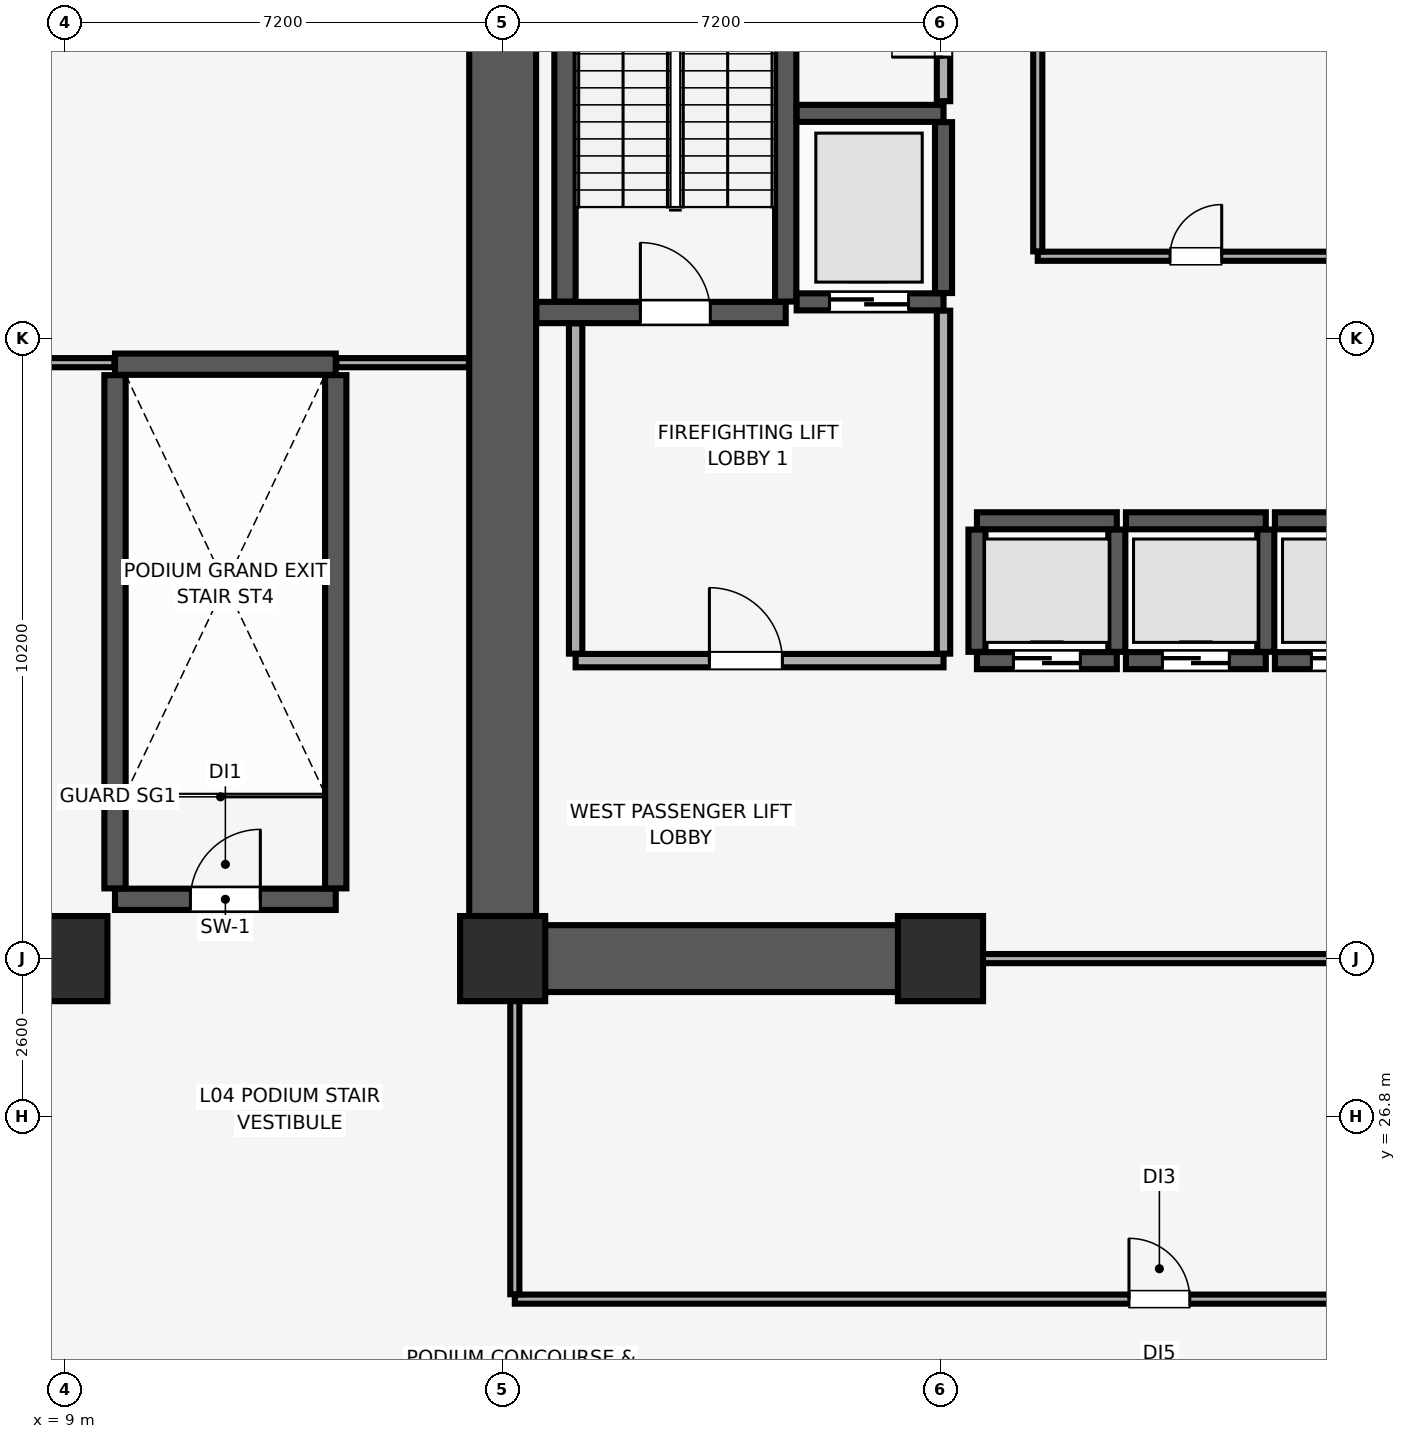
"""IFC4 building model, lengths in metres.
Left out: names, types, materials, properties, quantities, classifications, styles, units other than length and angle.
Written with IfcOpenShell. Run it as: python <this file> out.ifc"""

import sys

from ifc_helpers import new_model, si_unit, direction, frame, frame_2d, origin, origin_2d, place, context, subcontext, project, spatial, rectangle, extrude, element, fill, save


model = new_model("IFC4")
c1 = context("Model", 3, precision=1e-05, world=origin(), true_north=direction((0.0, 1.0)))
c2 = subcontext(c1, "Body", "Model", "MODEL_VIEW")
j1 = project(units=[si_unit("LENGTHUNIT", "METRE"), si_unit("PLANEANGLEUNIT", "RADIAN")], contexts=[c1])
p1 = place(None, origin())
s1 = spatial("IfcSite", under=j1, at=p1, CompositionType="ELEMENT")
p2 = place(p1, origin())
s2 = spatial("IfcBuilding", under=s1, at=p2, CompositionType="ELEMENT")
p3 = place(p2, frame((0.0, 0.0, 26.0)))
s3 = spatial("IfcBuildingStorey", under=s2, at=p3, CompositionType="ELEMENT", Elevation=26.0)
for number, where, z_axis, x_axis in (
    (1, (9.0, 29.4, 0.0), (0.0, 0.0, 1.0), (1.0, 0.0, 0.0)),
    (2, (16.2, 29.4, 0.0), (0.0, 0.0, 1.0), (1.0, 0.0, 0.0)),
    (3, (23.4, 29.4, 0.0), (0.0, 0.0, 1.0), (1.0, 0.0, 0.0)),
):
    element("IfcColumn", number, at=place(p3, frame(where, z_axis=z_axis, x_axis=x_axis)), inside=s3, PredefinedType="COLUMN", context=c2, shape_type="SweptSolid", body=[
        extrude(rectangle(XDim=1.4, YDim=1.4, at=origin_2d()), origin(), (0.0, 0.0, 1.0), 5.16),
    ])
p4 = place(p3, frame((16.2, 29.4, 0.0), z_axis=(0.0, 0.0, 1.0), x_axis=(0.0, 1.0, 0.0)))
e4 = element("IfcWall", 4, at=p4, inside=s3, PredefinedType="SHEAR", context=c2, shape_type="SweptSolid", body=[
    extrude(rectangle(XDim=19.2, YDim=1.1, at=frame_2d((9.6, 0.0))), origin(), (0.0, 0.0, 1.0), 5.12),
])
p5 = place(p3, frame((16.755, 29.4, 0.0), z_axis=(0.0, 0.0, 1.0), x_axis=(1.0, 0.0, 0.0)))
e5 = element("IfcWall", 5, at=p5, inside=s3, PredefinedType="SHEAR", context=c2, shape_type="SweptSolid", body=[
    extrude(rectangle(XDim=6.845, YDim=1.1, at=frame_2d((3.423, 0.0))), origin(), (0.0, 0.0, 1.0), 5.12),
])
p6 = place(p3, frame((16.755, 40.025, 0.0), z_axis=(0.0, 0.0, 1.0), x_axis=(1.0, 0.0, 0.0)))
e6 = element("IfcWall", 6, at=p6, inside=s3, PredefinedType="SHEAR", context=c2, shape_type="SweptSolid", body=[
    extrude(rectangle(XDim=4.1, YDim=0.35, at=frame_2d((2.05, 0.0))), origin(), (0.0, 0.0, 1.0), 5.12),
])
p7 = place(p6, frame((1.71, 0.0, 0.0)))
e7 = element("IfcOpeningElement", 7, at=p7, cuts=e6, PredefinedType="OPENING", context=c2, shape_type="SweptSolid", body=[
    extrude(rectangle(XDim=1.15, YDim=2.15, at=frame_2d((0.575, 1.075))), frame((0.0, 0.185, 0.0), z_axis=(0.0, -1.0, 0.0), x_axis=(1.0, 0.0, 0.0)), (0.0, 0.0, 1.0), 0.37),
])
for number, where, z_axis, x_axis in (
    (8, (17.225, 40.205, 0.0), (0.0, 0.0, 1.0), (0.0, 1.0, 0.0)),
    (9, (20.855, 40.205, 0.0), (0.0, 0.0, 1.0), (0.0, 1.0, 0.0)),
):
    element("IfcWall", number, at=place(p3, frame(where, z_axis=z_axis, x_axis=x_axis)), inside=s3, PredefinedType="SHEAR", context=c2, shape_type="SweptSolid", body=[
        extrude(rectangle(XDim=8.09, YDim=0.35, at=frame_2d((4.045, 0.0))), origin(), (0.0, 0.0, 1.0), 5.12),
    ])
p8 = place(p3, frame((9.825, 30.375, 0.0), z_axis=(0.0, 0.0, 1.0), x_axis=(1.0, 0.0, 0.0)))
e10 = element("IfcWall", 10, at=p8, inside=s3, PredefinedType="SHEAR", context=c2, shape_type="SweptSolid", body=[
    extrude(rectangle(XDim=3.63, YDim=0.35, at=frame_2d((1.815, 0.0))), origin(), (0.0, 0.0, 1.0), 5.12),
])
p9 = place(p8, frame((1.24, 0.0, 0.0)))
e11 = element("IfcOpeningElement", 11, at=p9, cuts=e10, PredefinedType="OPENING", context=c2, shape_type="SweptSolid", body=[
    extrude(rectangle(XDim=1.15, YDim=2.15, at=frame_2d((0.575, 1.075))), frame((0.0, 0.185, 0.0), z_axis=(0.0, -1.0, 0.0), x_axis=(1.0, 0.0, 0.0)), (0.0, 0.0, 1.0), 0.37),
])
p10 = place(p3, frame((9.825, 39.175, 0.0), z_axis=(0.0, 0.0, 1.0), x_axis=(1.0, 0.0, 0.0)))
e12 = element("IfcWall", 12, at=p10, inside=s3, PredefinedType="SHEAR", context=c2, shape_type="SweptSolid", body=[
    extrude(rectangle(XDim=3.63, YDim=0.35, at=frame_2d((1.815, 0.0))), origin(), (0.0, 0.0, 1.0), 5.12),
])
for number, where, z_axis, x_axis in (
    (13, (9.825, 30.555, 0.0), (0.0, 0.0, 1.0), (0.0, 1.0, 0.0)),
    (14, (13.455, 30.555, 0.0), (0.0, 0.0, 1.0), (0.0, 1.0, 0.0)),
):
    element("IfcWall", number, at=place(p3, frame(where, z_axis=z_axis, x_axis=x_axis)), inside=s3, PredefinedType="SHEAR", context=c2, shape_type="SweptSolid", body=[
        extrude(rectangle(XDim=8.44, YDim=0.35, at=frame_2d((4.22, 0.0))), origin(), (0.0, 0.0, 1.0), 5.12),
    ])
p11 = place(p3, frame((24.0, 34.3, 0.0), z_axis=(0.0, 0.0, 1.0), x_axis=(1.0, 0.0, 0.0)))
e15 = element("IfcWall", 15, at=p11, inside=s3, PredefinedType="SHEAR", context=c2, shape_type="SweptSolid", body=[
    extrude(rectangle(XDim=2.3, YDim=0.28, at=frame_2d((1.15, 0.0))), origin(), (0.0, 0.0, 1.0), 5.12),
])
p12 = place(p11, frame((0.6, 0.0, 0.0)))
e16 = element("IfcOpeningElement", 16, at=p12, cuts=e15, PredefinedType="OPENING", context=c2, shape_type="SweptSolid", body=[
    extrude(rectangle(XDim=1.1, YDim=2.2, at=frame_2d((0.55, 1.1))), frame((0.0, 0.15, 0.0), z_axis=(0.0, -1.0, 0.0), x_axis=(1.0, 0.0, 0.0)), (0.0, 0.0, 1.0), 0.3),
])
p13 = place(p3, frame((24.0, 36.6, 0.0), z_axis=(0.0, 0.0, 1.0), x_axis=(1.0, 0.0, 0.0)))
e17 = element("IfcWall", 17, at=p13, inside=s3, PredefinedType="SHEAR", context=c2, shape_type="SweptSolid", body=[
    extrude(rectangle(XDim=2.3, YDim=0.28, at=frame_2d((1.15, 0.0))), origin(), (0.0, 0.0, 1.0), 5.12),
])
for number, where, z_axis, x_axis in (
    (18, (24.0, 34.445, 0.0), (0.0, 0.0, 1.0), (0.0, 1.0, 0.0)),
    (19, (26.3, 34.445, 0.0), (0.0, 0.0, 1.0), (0.0, 1.0, 0.0)),
):
    element("IfcWall", number, at=place(p3, frame(where, z_axis=z_axis, x_axis=x_axis)), inside=s3, PredefinedType="SHEAR", context=c2, shape_type="SweptSolid", body=[
        extrude(rectangle(XDim=2.01, YDim=0.28, at=frame_2d((1.005, 0.0))), origin(), (0.0, 0.0, 1.0), 5.12),
    ])
p14 = place(p3, frame((26.45, 34.3, 0.0), z_axis=(0.0, 0.0, 1.0), x_axis=(1.0, 0.0, 0.0)))
e20 = element("IfcWall", 20, at=p14, inside=s3, PredefinedType="SHEAR", context=c2, shape_type="SweptSolid", body=[
    extrude(rectangle(XDim=2.3, YDim=0.28, at=frame_2d((1.15, 0.0))), origin(), (0.0, 0.0, 1.0), 5.12),
])
p15 = place(p14, frame((0.6, 0.0, 0.0)))
e21 = element("IfcOpeningElement", 21, at=p15, cuts=e20, PredefinedType="OPENING", context=c2, shape_type="SweptSolid", body=[
    extrude(rectangle(XDim=1.1, YDim=2.2, at=frame_2d((0.55, 1.1))), frame((0.0, 0.15, 0.0), z_axis=(0.0, -1.0, 0.0), x_axis=(1.0, 0.0, 0.0)), (0.0, 0.0, 1.0), 0.3),
])
p16 = place(p3, frame((26.45, 36.6, 0.0), z_axis=(0.0, 0.0, 1.0), x_axis=(1.0, 0.0, 0.0)))
e22 = element("IfcWall", 22, at=p16, inside=s3, PredefinedType="SHEAR", context=c2, shape_type="SweptSolid", body=[
    extrude(rectangle(XDim=2.3, YDim=0.28, at=frame_2d((1.15, 0.0))), origin(), (0.0, 0.0, 1.0), 5.12),
])
p17 = place(p3, frame((28.75, 34.445, 0.0), z_axis=(0.0, 0.0, 1.0), x_axis=(0.0, 1.0, 0.0)))
e23 = element("IfcWall", 23, at=p17, inside=s3, PredefinedType="SHEAR", context=c2, shape_type="SweptSolid", body=[
    extrude(rectangle(XDim=2.01, YDim=0.28, at=frame_2d((1.005, 0.0))), origin(), (0.0, 0.0, 1.0), 5.12),
])
p18 = place(p3, frame((28.9, 34.3, 0.0), z_axis=(0.0, 0.0, 1.0), x_axis=(1.0, 0.0, 0.0)))
e24 = element("IfcWall", 24, at=p18, inside=s3, PredefinedType="SHEAR", context=c2, shape_type="SweptSolid", body=[
    extrude(rectangle(XDim=2.3, YDim=0.28, at=frame_2d((1.15, 0.0))), origin(), (0.0, 0.0, 1.0), 5.12),
])
p19 = place(p18, frame((0.6, 0.0, 0.0)))
e25 = element("IfcOpeningElement", 25, at=p19, cuts=e24, PredefinedType="OPENING", context=c2, shape_type="SweptSolid", body=[
    extrude(rectangle(XDim=1.1, YDim=2.2, at=frame_2d((0.55, 1.1))), frame((0.0, 0.15, 0.0), z_axis=(0.0, -1.0, 0.0), x_axis=(1.0, 0.0, 0.0)), (0.0, 0.0, 1.0), 0.3),
])
p20 = place(p3, frame((28.9, 36.6, 0.0), z_axis=(0.0, 0.0, 1.0), x_axis=(1.0, 0.0, 0.0)))
e26 = element("IfcWall", 26, at=p20, inside=s3, PredefinedType="SHEAR", context=c2, shape_type="SweptSolid", body=[
    extrude(rectangle(XDim=2.3, YDim=0.28, at=frame_2d((1.15, 0.0))), origin(), (0.0, 0.0, 1.0), 5.12),
])
p21 = place(p3, frame((21.035, 40.2, 0.0), z_axis=(0.0, 0.0, 1.0), x_axis=(1.0, 0.0, 0.0)))
e27 = element("IfcWall", 27, at=p21, inside=s3, PredefinedType="SHEAR", context=c2, shape_type="SweptSolid", body=[
    extrude(rectangle(XDim=2.415, YDim=0.28, at=frame_2d((1.208, 0.0))), origin(), (0.0, 0.0, 1.0), 5.12),
])
p22 = place(p21, frame((0.54, 0.0, 0.0)))
e28 = element("IfcOpeningElement", 28, at=p22, cuts=e27, PredefinedType="OPENING", context=c2, shape_type="SweptSolid", body=[
    extrude(rectangle(XDim=1.3, YDim=2.3, at=frame_2d((0.65, 1.15))), frame((0.0, 0.15, 0.0), z_axis=(0.0, -1.0, 0.0), x_axis=(1.0, 0.0, 0.0)), (0.0, 0.0, 1.0), 0.3),
])
p23 = place(p3, frame((21.035, 43.3, 0.0), z_axis=(0.0, 0.0, 1.0), x_axis=(1.0, 0.0, 0.0)))
e29 = element("IfcWall", 29, at=p23, inside=s3, PredefinedType="SHEAR", context=c2, shape_type="SweptSolid", body=[
    extrude(rectangle(XDim=2.415, YDim=0.28, at=frame_2d((1.208, 0.0))), origin(), (0.0, 0.0, 1.0), 5.12),
])
p24 = place(p3, frame((23.45, 40.345, 0.0), z_axis=(0.0, 0.0, 1.0), x_axis=(0.0, 1.0, 0.0)))
e30 = element("IfcWall", 30, at=p24, inside=s3, PredefinedType="SHEAR", context=c2, shape_type="SweptSolid", body=[
    extrude(rectangle(XDim=2.81, YDim=0.28, at=frame_2d((1.405, 0.0))), origin(), (0.0, 0.0, 1.0), 5.12),
])
p25 = place(p3, frame((17.4, 34.3, 0.0), z_axis=(0.0, 0.0, 1.0), x_axis=(1.0, 0.0, 0.0)))
e31 = element("IfcWall", 31, at=p25, inside=s3, PredefinedType="PARTITIONING", context=c2, shape_type="SweptSolid", body=[
    extrude(rectangle(XDim=6.05, YDim=0.22, at=frame_2d((3.025, 0.0))), origin(), (0.0, 0.0, 1.0), 5.12),
])
p26 = place(p25, frame((2.2, 0.0, 0.0)))
e32 = element("IfcOpeningElement", 32, at=p26, cuts=e31, PredefinedType="OPENING", context=c2, shape_type="SweptSolid", body=[
    extrude(rectangle(XDim=1.2, YDim=2.15, at=frame_2d((0.6, 1.075))), frame((0.0, 0.12, 0.0), z_axis=(0.0, -1.0, 0.0), x_axis=(1.0, 0.0, 0.0)), (0.0, 0.0, 1.0), 0.24),
])
p27 = place(p3, frame((17.4, 34.415, 0.0), z_axis=(0.0, 0.0, 1.0), x_axis=(0.0, 1.0, 0.0)))
e33 = element("IfcWall", 33, at=p27, inside=s3, PredefinedType="PARTITIONING", context=c2, shape_type="SweptSolid", body=[
    extrude(rectangle(XDim=5.43, YDim=0.22, at=frame_2d((2.715, 0.0))), origin(), (0.0, 0.0, 1.0), 5.12),
])
p28 = place(p3, frame((23.45, 34.415, 0.0), z_axis=(0.0, 0.0, 1.0), x_axis=(0.0, 1.0, 0.0)))
e34 = element("IfcWall", 34, at=p28, inside=s3, PredefinedType="PARTITIONING", context=c2, shape_type="SweptSolid", body=[
    extrude(rectangle(XDim=5.64, YDim=0.22, at=frame_2d((2.82, 0.0))), origin(), (0.0, 0.0, 1.0), 5.12),
])
p29 = place(p3, frame((23.45, 43.5, 0.0), z_axis=(0.0, 0.0, 1.0), x_axis=(0.0, 1.0, 0.0)))
e35 = element("IfcWall", 35, at=p29, inside=s3, PredefinedType="PARTITIONING", context=c2, shape_type="SweptSolid", body=[
    extrude(rectangle(XDim=2.235, YDim=0.22, at=frame_2d((1.118, 0.0))), origin(), (0.0, 0.0, 1.0), 5.12),
])
p30 = place(p29, frame((0.725, 0.0, 0.0)))
e36 = element("IfcOpeningElement", 36, at=p30, cuts=e35, PredefinedType="OPENING", context=c2, shape_type="SweptSolid", body=[
    extrude(rectangle(XDim=0.85, YDim=2.1, at=frame_2d((0.425, 1.05))), frame((0.0, 0.12, 0.0), z_axis=(0.0, -1.0, 0.0), x_axis=(1.0, 0.0, 0.0)), (0.0, 0.0, 1.0), 0.24),
])
p31 = place(p3, frame((25.0, 40.95, 0.0), z_axis=(0.0, 0.0, 1.0), x_axis=(1.0, 0.0, 0.0)))
e37 = element("IfcWall", 37, at=p31, inside=s3, PredefinedType="PARTITIONING", context=c2, shape_type="SweptSolid", body=[
    extrude(rectangle(XDim=5.2, YDim=0.15, at=frame_2d((2.6, 0.0))), origin(), (0.0, 0.0, 1.0), 5.12),
])
p32 = place(p31, frame((2.175, 0.0, 0.0)))
e38 = element("IfcOpeningElement", 38, at=p32, cuts=e37, PredefinedType="OPENING", context=c2, shape_type="SweptSolid", body=[
    extrude(rectangle(XDim=0.85, YDim=2.1, at=frame_2d((0.425, 1.05))), frame((0.0, 0.085, 0.0), z_axis=(0.0, -1.0, 0.0), x_axis=(1.0, 0.0, 0.0)), (0.0, 0.0, 1.0), 0.17),
])
p33 = place(p3, frame((25.0, 41.03, 0.0), z_axis=(0.0, 0.0, 1.0), x_axis=(0.0, 1.0, 0.0)))
e39 = element("IfcWall", 39, at=p33, inside=s3, PredefinedType="PARTITIONING", context=c2, shape_type="SweptSolid", body=[
    extrude(rectangle(XDim=7.19, YDim=0.15, at=frame_2d((3.595, 0.0))), origin(), (0.0, 0.0, 1.0), 5.12),
])
p34 = place(p3, frame((-3.045, 39.2, 0.0), z_axis=(0.0, 0.0, 1.0), x_axis=(1.0, 0.0, 0.0)))
e40 = element("IfcWall", 40, at=p34, inside=s3, PredefinedType="PARTITIONING", context=c2, shape_type="SweptSolid", body=[
    extrude(rectangle(XDim=12.86, YDim=0.15, at=frame_2d((6.43, 0.0))), origin(), (0.0, 0.0, 1.0), 5.12),
])
p35 = place(p34, frame((8.295, 0.0, 0.0)))
e41 = element("IfcOpeningElement", 41, at=p35, cuts=e40, PredefinedType="OPENING", context=c2, shape_type="SweptSolid", body=[
    extrude(rectangle(XDim=1.5, YDim=2.25, at=frame_2d((0.75, 1.125))), frame((0.0, 0.085, 0.0), z_axis=(0.0, -1.0, 0.0), x_axis=(1.0, 0.0, 0.0)), (0.0, 0.0, 1.0), 0.17),
])
p36 = place(p3, frame((13.465, 39.2, 0.0), z_axis=(0.0, 0.0, 1.0), x_axis=(1.0, 0.0, 0.0)))
e42 = element("IfcWall", 42, at=p36, inside=s3, PredefinedType="PARTITIONING", context=c2, shape_type="SweptSolid", body=[
    extrude(rectangle(XDim=2.18, YDim=0.15, at=frame_2d((1.09, 0.0))), origin(), (0.0, 0.0, 1.0), 5.12),
])
p37 = place(p3, frame((16.4, 23.8, 0.0), z_axis=(0.0, 0.0, 1.0), x_axis=(1.0, 0.0, 0.0)))
e43 = element("IfcWall", 43, at=p37, inside=s3, PredefinedType="PARTITIONING", context=c2, shape_type="SweptSolid", body=[
    extrude(rectangle(XDim=23.6, YDim=0.15, at=frame_2d((11.8, 0.0))), origin(), (0.0, 0.0, 1.0), 5.12),
])
p38 = place(p37, frame((10.1, 0.0, 0.0)))
e44 = element("IfcOpeningElement", 44, at=p38, cuts=e43, PredefinedType="OPENING", context=c2, shape_type="SweptSolid", body=[
    extrude(rectangle(XDim=1.0, YDim=2.15, at=frame_2d((0.5, 1.075))), frame((0.0, 0.085, 0.0), z_axis=(0.0, -1.0, 0.0), x_axis=(1.0, 0.0, 0.0)), (0.0, 0.0, 1.0), 0.17),
])
p39 = place(p3, frame((23.61, 29.4, 0.0), z_axis=(0.0, 0.0, 1.0), x_axis=(1.0, 0.0, 0.0)))
e45 = element("IfcWall", 45, at=p39, inside=s3, PredefinedType="PARTITIONING", context=c2, shape_type="SweptSolid", body=[
    extrude(rectangle(XDim=6.78, YDim=0.15, at=frame_2d((3.39, 0.0))), origin(), (0.0, 0.0, 1.0), 4.06),
])
p40 = place(p3, frame((16.4, 23.88, 0.0), z_axis=(0.0, 0.0, 1.0), x_axis=(0.0, 1.0, 0.0)))
e46 = element("IfcWall", 46, at=p40, inside=s3, PredefinedType="PARTITIONING", context=c2, shape_type="SweptSolid", body=[
    extrude(rectangle(XDim=5.51, YDim=0.15, at=frame_2d((2.755, 0.0))), origin(), (0.0, 0.0, 1.0), 4.627),
])
p41 = place(p7, origin())
e47 = element("IfcDoor", 47, at=p41, inside=s3, OperationType="SINGLE_SWING_LEFT", PredefinedType="DOOR", context=c2, shape_type="SweptSolid", body=[
    extrude(rectangle(XDim=1.15, YDim=2.15, at=frame_2d((0.575, 1.075))), frame((0.0, 0.025, 0.0), z_axis=(0.0, -1.0, 0.0), x_axis=(1.0, 0.0, 0.0)), (0.0, 0.0, 1.0), 0.05),
])
fill(e7, e47)
p42 = place(p9, origin())
e48 = element("IfcDoor", 48, at=p42, inside=s3, OperationType="SINGLE_SWING_RIGHT", PredefinedType="DOOR", context=c2, shape_type="SweptSolid", body=[
    extrude(rectangle(XDim=1.15, YDim=2.15, at=frame_2d((0.575, 1.075))), frame((0.0, 0.025, 0.0), z_axis=(0.0, -1.0, 0.0), x_axis=(1.0, 0.0, 0.0)), (0.0, 0.0, 1.0), 0.05),
])
fill(e11, e48)
p43 = place(p12, origin())
e49 = element("IfcDoor", 49, at=p43, inside=s3, OperationType="DOUBLE_DOOR_SLIDING", PredefinedType="DOOR", context=c2, shape_type="SweptSolid", body=[
    extrude(rectangle(XDim=1.1, YDim=2.2, at=frame_2d((0.55, 1.1))), frame((0.0, 0.025, 0.0), z_axis=(0.0, -1.0, 0.0), x_axis=(1.0, 0.0, 0.0)), (0.0, 0.0, 1.0), 0.05),
])
fill(e16, e49)
p44 = place(p15, origin())
e50 = element("IfcDoor", 50, at=p44, inside=s3, OperationType="DOUBLE_DOOR_SLIDING", PredefinedType="DOOR", context=c2, shape_type="SweptSolid", body=[
    extrude(rectangle(XDim=1.1, YDim=2.2, at=frame_2d((0.55, 1.1))), frame((0.0, 0.025, 0.0), z_axis=(0.0, -1.0, 0.0), x_axis=(1.0, 0.0, 0.0)), (0.0, 0.0, 1.0), 0.05),
])
fill(e21, e50)
p45 = place(p19, origin())
e51 = element("IfcDoor", 51, at=p45, inside=s3, OperationType="DOUBLE_DOOR_SLIDING", PredefinedType="DOOR", context=c2, shape_type="SweptSolid", body=[
    extrude(rectangle(XDim=1.1, YDim=2.2, at=frame_2d((0.55, 1.1))), frame((0.0, 0.025, 0.0), z_axis=(0.0, -1.0, 0.0), x_axis=(1.0, 0.0, 0.0)), (0.0, 0.0, 1.0), 0.05),
])
fill(e25, e51)
p46 = place(p22, origin())
e52 = element("IfcDoor", 52, at=p46, inside=s3, OperationType="DOUBLE_DOOR_SLIDING", PredefinedType="DOOR", context=c2, shape_type="SweptSolid", body=[
    extrude(rectangle(XDim=1.3, YDim=2.3, at=frame_2d((0.65, 1.15))), frame((0.0, 0.025, 0.0), z_axis=(0.0, -1.0, 0.0), x_axis=(1.0, 0.0, 0.0)), (0.0, 0.0, 1.0), 0.05),
])
fill(e28, e52)
p47 = place(p26, origin())
e53 = element("IfcDoor", 53, at=p47, inside=s3, OperationType="SINGLE_SWING_LEFT", PredefinedType="DOOR", context=c2, shape_type="SweptSolid", body=[
    extrude(rectangle(XDim=1.2, YDim=2.15, at=frame_2d((0.6, 1.075))), frame((0.0, 0.025, 0.0), z_axis=(0.0, -1.0, 0.0), x_axis=(1.0, 0.0, 0.0)), (0.0, 0.0, 1.0), 0.05),
])
fill(e32, e53)
p48 = place(p30, origin())
e54 = element("IfcDoor", 54, at=p48, inside=s3, OperationType="SINGLE_SWING_LEFT", PredefinedType="DOOR", context=c2, shape_type="SweptSolid", body=[
    extrude(rectangle(XDim=0.85, YDim=2.1, at=frame_2d((0.425, 1.05))), frame((0.0, 0.025, 0.0), z_axis=(0.0, -1.0, 0.0), x_axis=(1.0, 0.0, 0.0)), (0.0, 0.0, 1.0), 0.05),
])
fill(e36, e54)
p49 = place(p32, origin())
e55 = element("IfcDoor", 55, at=p49, inside=s3, OperationType="SINGLE_SWING_RIGHT", PredefinedType="DOOR", context=c2, shape_type="SweptSolid", body=[
    extrude(rectangle(XDim=0.85, YDim=2.1, at=frame_2d((0.425, 1.05))), frame((0.0, 0.025, 0.0), z_axis=(0.0, -1.0, 0.0), x_axis=(1.0, 0.0, 0.0)), (0.0, 0.0, 1.0), 0.05),
])
fill(e38, e55)
p50 = place(p38, origin())
e56 = element("IfcDoor", 56, at=p50, inside=s3, OperationType="SINGLE_SWING_LEFT", PredefinedType="DOOR", context=c2, shape_type="SweptSolid", body=[
    extrude(rectangle(XDim=1.0, YDim=2.15, at=frame_2d((0.5, 1.075))), frame((0.0, 0.025, 0.0), z_axis=(0.0, -1.0, 0.0), x_axis=(1.0, 0.0, 0.0)), (0.0, 0.0, 1.0), 0.05),
])
fill(e44, e56)
save(model, sys.argv[1])
